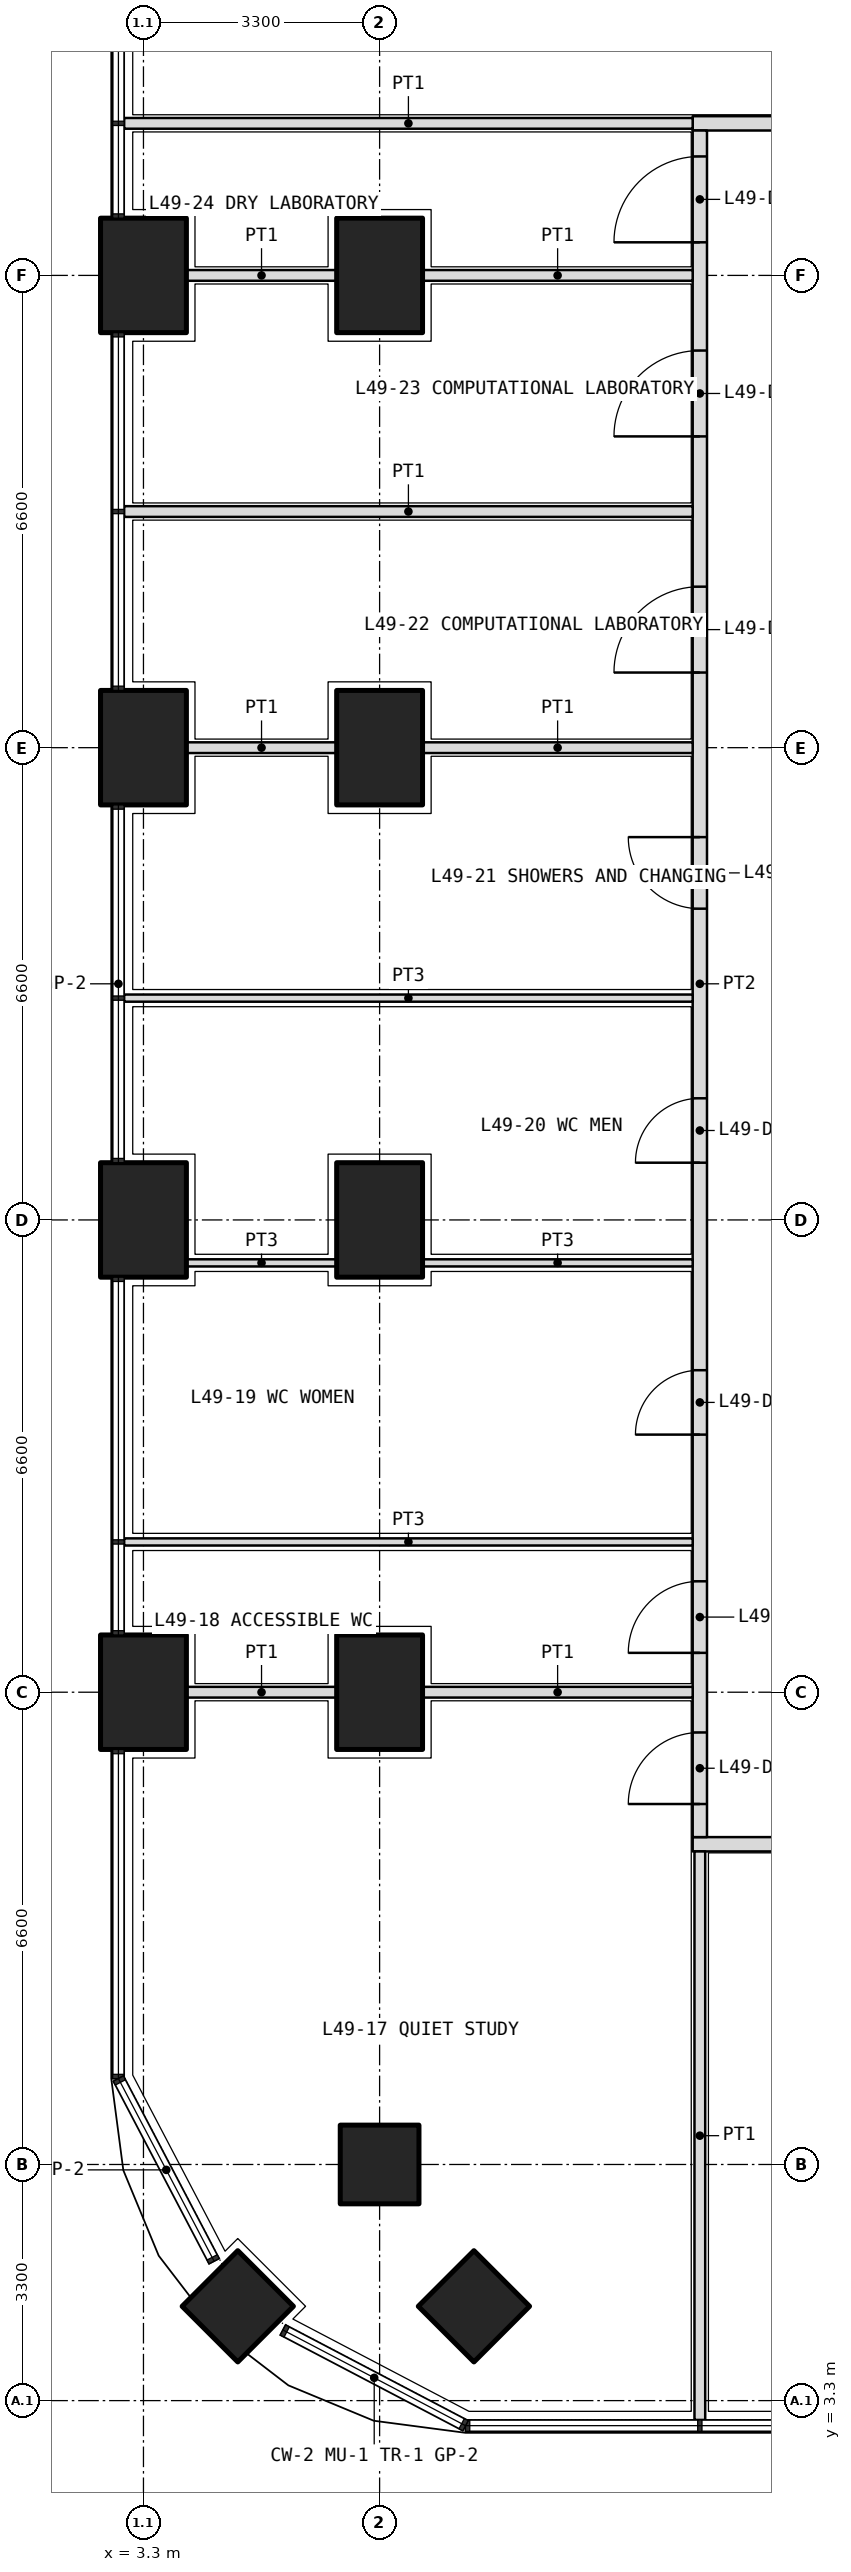
"""IFC4 building model, lengths in metres.
Left out: names, types, materials, properties, quantities, classifications, styles, units other than length and angle.
Written with IfcOpenShell. Run it as: python <this file> out.ifc"""

import sys

from ifc_helpers import new_model, si_unit, direction, frame, frame_2d, origin, origin_2d, place, context, subcontext, project, spatial, rectangle, extrude, element, fill, save


model = new_model("IFC4")
c1 = context("Model", 3, precision=1e-05, world=origin(), true_north=direction((0.0, 1.0)))
c2 = subcontext(c1, "Body", "Model", "MODEL_VIEW")
j1 = project(units=[si_unit("LENGTHUNIT", "METRE"), si_unit("PLANEANGLEUNIT", "RADIAN")], contexts=[c1])
p1 = place(None, origin())
s1 = spatial("IfcSite", under=j1, at=p1, CompositionType="ELEMENT")
p2 = place(p1, origin())
s2 = spatial("IfcBuilding", under=s1, at=p2, CompositionType="ELEMENT")
p3 = place(p2, frame((0.0, 0.0, 214.5)))
s3 = spatial("IfcBuildingStorey", under=s2, at=p3, CompositionType="ELEMENT", Elevation=214.5)
p4 = place(p3, frame((4.618, 4.618, 0.0), z_axis=(0.0, 0.0, 1.0), x_axis=(0.707106781187, 0.707106781187, 0.0)))
e1 = element("IfcColumn", 1, at=p4, inside=s3, PredefinedType="COLUMN", context=c2, shape_type="SweptSolid", body=[
    extrude(rectangle(XDim=1.1, YDim=1.1, at=origin_2d()), origin(), (0.0, 0.0, 1.0), 4.2),
])
for number, where, z_axis, x_axis in (
    (2, (3.3, 13.2, 0.0), (0.0, 0.0, 1.0), (0.0, 1.0, 0.0)),
    (3, (3.3, 19.8, 0.0), (0.0, 0.0, 1.0), (0.0, 1.0, 0.0)),
    (4, (3.3, 26.4, 0.0), (0.0, 0.0, 1.0), (0.0, 1.0, 0.0)),
    (5, (3.3, 33.0, 0.0), (0.0, 0.0, 1.0), (0.0, 1.0, 0.0)),
):
    element("IfcColumn", number, at=place(p3, frame(where, z_axis=z_axis, x_axis=x_axis)), inside=s3, PredefinedType="COLUMN", context=c2, shape_type="SweptSolid", body=[
        extrude(rectangle(XDim=1.6, YDim=1.2, at=origin_2d()), origin(), (0.0, 0.0, 1.0), 4.2),
    ])
for number, where, z_axis, x_axis in (
    (6, (6.6, 6.6, 0.0), (0.0, 0.0, 1.0), (1.0, 0.0, 0.0)),
    (7, (7.918, 4.618, 0.0), (0.0, 0.0, 1.0), (0.707, 0.707, 0.0)),
):
    element("IfcColumn", number, at=place(p3, frame(where, z_axis=z_axis, x_axis=x_axis)), inside=s3, PredefinedType="COLUMN", context=c2, shape_type="SweptSolid", body=[
        extrude(rectangle(XDim=1.1, YDim=1.1, at=origin_2d()), origin(), (0.0, 0.0, 1.0), 4.2),
    ])
for number, where, z_axis, x_axis in (
    (8, (6.6, 13.2, 0.0), (0.0, 0.0, 1.0), (0.0, 1.0, 0.0)),
    (9, (6.6, 19.8, 0.0), (0.0, 0.0, 1.0), (0.0, 1.0, 0.0)),
    (10, (6.6, 26.4, 0.0), (0.0, 0.0, 1.0), (0.0, 1.0, 0.0)),
    (11, (6.6, 33.0, 0.0), (0.0, 0.0, 1.0), (0.0, 1.0, 0.0)),
):
    element("IfcColumn", number, at=place(p3, frame(where, z_axis=z_axis, x_axis=x_axis)), inside=s3, PredefinedType="COLUMN", context=c2, shape_type="SweptSolid", body=[
        extrude(rectangle(XDim=1.6, YDim=1.2, at=origin_2d()), origin(), (0.0, 0.0, 1.0), 4.2),
    ])
p5 = place(p3, frame((10.975, 11.075, 0.0), z_axis=(0.0, 0.0, 1.0), x_axis=(1.0, 0.0, 0.0)))
e12 = element("IfcWall", 12, at=p5, inside=s3, PredefinedType="PARTITIONING", context=c2, shape_type="SweptSolid", body=[
    extrude(rectangle(XDim=30.85, YDim=0.2, at=frame_2d((15.425, 0.0))), origin(), (0.0, 0.0, 1.0), 2.85),
])
p6 = place(p5, frame((2.312, 0.0, 0.0)))
e13 = element("IfcOpeningElement", 13, at=p6, cuts=e12, PredefinedType="OPENING", context=c2, shape_type="SweptSolid", body=[
    extrude(rectangle(XDim=1.0, YDim=2.1, at=frame_2d((0.5, 1.05))), frame((0.0, 0.11, 0.0), z_axis=(0.0, -1.0, 0.0), x_axis=(1.0, 0.0, 0.0)), (0.0, 0.0, 1.0), 0.22),
])
p7 = place(p5, frame((9.975, 0.0, 0.0)))
e14 = element("IfcOpeningElement", 14, at=p7, cuts=e12, PredefinedType="OPENING", context=c2, shape_type="SweptSolid", body=[
    extrude(rectangle(XDim=1.0, YDim=2.1, at=frame_2d((0.5, 1.05))), frame((0.0, 0.11, 0.0), z_axis=(0.0, -1.0, 0.0), x_axis=(1.0, 0.0, 0.0)), (0.0, 0.0, 1.0), 0.22),
])
p8 = place(p5, frame((16.575, 0.0, 0.0)))
e15 = element("IfcOpeningElement", 15, at=p8, cuts=e12, PredefinedType="OPENING", context=c2, shape_type="SweptSolid", body=[
    extrude(rectangle(XDim=1.0, YDim=2.1, at=frame_2d((0.5, 1.05))), frame((0.0, 0.11, 0.0), z_axis=(0.0, -1.0, 0.0), x_axis=(1.0, 0.0, 0.0)), (0.0, 0.0, 1.0), 0.22),
])
p9 = place(p5, frame((23.175, 0.0, 0.0)))
e16 = element("IfcOpeningElement", 16, at=p9, cuts=e12, PredefinedType="OPENING", context=c2, shape_type="SweptSolid", body=[
    extrude(rectangle(XDim=1.0, YDim=2.1, at=frame_2d((0.5, 1.05))), frame((0.0, 0.11, 0.0), z_axis=(0.0, -1.0, 0.0), x_axis=(1.0, 0.0, 0.0)), (0.0, 0.0, 1.0), 0.22),
])
p10 = place(p5, frame((29.188, 0.0, 0.0)))
e17 = element("IfcOpeningElement", 17, at=p10, cuts=e12, PredefinedType="OPENING", context=c2, shape_type="SweptSolid", body=[
    extrude(rectangle(XDim=1.0, YDim=2.1, at=frame_2d((0.5, 1.05))), frame((0.0, 0.11, 0.0), z_axis=(0.0, -1.0, 0.0), x_axis=(1.0, 0.0, 0.0)), (0.0, 0.0, 1.0), 0.22),
])
p11 = place(p3, frame((10.975, 35.125, 0.0), z_axis=(0.0, 0.0, 1.0), x_axis=(1.0, 0.0, 0.0)))
e18 = element("IfcWall", 18, at=p11, inside=s3, PredefinedType="PARTITIONING", context=c2, shape_type="SweptSolid", body=[
    extrude(rectangle(XDim=5.525, YDim=0.2, at=frame_2d((2.762, 0.0))), origin(), (0.0, 0.0, 1.0), 2.85),
])
p12 = place(p11, frame((2.312, 0.0, 0.0)))
e19 = element("IfcOpeningElement", 19, at=p12, cuts=e18, PredefinedType="OPENING", context=c2, shape_type="SweptSolid", body=[
    extrude(rectangle(XDim=1.0, YDim=2.1, at=frame_2d((0.5, 1.05))), frame((0.0, 0.11, 0.0), z_axis=(0.0, -1.0, 0.0), x_axis=(1.0, 0.0, 0.0)), (0.0, 0.0, 1.0), 0.22),
])
p13 = place(p3, frame((11.075, 11.175, 0.0), z_axis=(0.0, 0.0, 1.0), x_axis=(0.0, 1.0, 0.0)))
e20 = element("IfcWall", 20, at=p13, inside=s3, PredefinedType="PARTITIONING", context=c2, shape_type="SweptSolid", body=[
    extrude(rectangle(XDim=23.85, YDim=0.2, at=frame_2d((11.925, 0.0))), origin(), (0.0, 0.0, 1.0), 2.85),
])
p14 = place(p13, frame((0.462, 0.0, 0.0)))
e21 = element("IfcOpeningElement", 21, at=p14, cuts=e20, PredefinedType="OPENING", context=c2, shape_type="SweptSolid", body=[
    extrude(rectangle(XDim=1.0, YDim=2.1, at=frame_2d((0.5, 1.05))), frame((0.0, 0.11, 0.0), z_axis=(0.0, -1.0, 0.0), x_axis=(1.0, 0.0, 0.0)), (0.0, 0.0, 1.0), 0.22),
])
p15 = place(p13, frame((2.575, 0.0, 0.0)))
e22 = element("IfcOpeningElement", 22, at=p15, cuts=e20, PredefinedType="OPENING", context=c2, shape_type="SweptSolid", body=[
    extrude(rectangle(XDim=1.0, YDim=2.1, at=frame_2d((0.5, 1.05))), frame((0.0, 0.11, 0.0), z_axis=(0.0, -1.0, 0.0), x_axis=(1.0, 0.0, 0.0)), (0.0, 0.0, 1.0), 0.22),
])
p16 = place(p13, frame((5.625, 0.0, 0.0)))
e23 = element("IfcOpeningElement", 23, at=p16, cuts=e20, PredefinedType="OPENING", context=c2, shape_type="SweptSolid", body=[
    extrude(rectangle(XDim=0.9, YDim=2.1, at=frame_2d((0.45, 1.05))), frame((0.0, 0.11, 0.0), z_axis=(0.0, -1.0, 0.0), x_axis=(1.0, 0.0, 0.0)), (0.0, 0.0, 1.0), 0.22),
])
p17 = place(p13, frame((9.425, 0.0, 0.0)))
e24 = element("IfcOpeningElement", 24, at=p17, cuts=e20, PredefinedType="OPENING", context=c2, shape_type="SweptSolid", body=[
    extrude(rectangle(XDim=0.9, YDim=2.1, at=frame_2d((0.45, 1.05))), frame((0.0, 0.11, 0.0), z_axis=(0.0, -1.0, 0.0), x_axis=(1.0, 0.0, 0.0)), (0.0, 0.0, 1.0), 0.22),
])
p18 = place(p13, frame((12.975, 0.0, 0.0)))
e25 = element("IfcOpeningElement", 25, at=p18, cuts=e20, PredefinedType="OPENING", context=c2, shape_type="SweptSolid", body=[
    extrude(rectangle(XDim=1.0, YDim=2.1, at=frame_2d((0.5, 1.05))), frame((0.0, 0.11, 0.0), z_axis=(0.0, -1.0, 0.0), x_axis=(1.0, 0.0, 0.0)), (0.0, 0.0, 1.0), 0.22),
])
p19 = place(p13, frame((16.275, 0.0, 0.0)))
e26 = element("IfcOpeningElement", 26, at=p19, cuts=e20, PredefinedType="OPENING", context=c2, shape_type="SweptSolid", body=[
    extrude(rectangle(XDim=1.2, YDim=2.1, at=frame_2d((0.6, 1.05))), frame((0.0, 0.11, 0.0), z_axis=(0.0, -1.0, 0.0), x_axis=(1.0, 0.0, 0.0)), (0.0, 0.0, 1.0), 0.22),
])
p20 = place(p13, frame((19.575, 0.0, 0.0)))
e27 = element("IfcOpeningElement", 27, at=p20, cuts=e20, PredefinedType="OPENING", context=c2, shape_type="SweptSolid", body=[
    extrude(rectangle(XDim=1.2, YDim=2.1, at=frame_2d((0.6, 1.05))), frame((0.0, 0.11, 0.0), z_axis=(0.0, -1.0, 0.0), x_axis=(1.0, 0.0, 0.0)), (0.0, 0.0, 1.0), 0.22),
])
p21 = place(p13, frame((22.288, 0.0, 0.0)))
e28 = element("IfcOpeningElement", 28, at=p21, cuts=e20, PredefinedType="OPENING", context=c2, shape_type="SweptSolid", body=[
    extrude(rectangle(XDim=1.2, YDim=2.1, at=frame_2d((0.6, 1.05))), frame((0.0, 0.11, 0.0), z_axis=(0.0, -1.0, 0.0), x_axis=(1.0, 0.0, 0.0)), (0.0, 0.0, 1.0), 0.22),
])
for number, where, z_axis, x_axis in (
    (29, (11.075, 3.03, 0.0), (0.0, 0.0, 1.0), (0.0, 1.0, 0.0)),
    (30, (3.03, 35.125, 0.0), (0.0, 0.0, 1.0), (1.0, 0.0, 0.0)),
):
    element("IfcWall", number, at=place(p3, frame(where, z_axis=z_axis, x_axis=x_axis)), inside=s3, PredefinedType="PARTITIONING", context=c2, shape_type="SweptSolid", body=[
        extrude(rectangle(XDim=7.945, YDim=0.15, at=frame_2d((3.973, 0.0))), origin(), (0.0, 0.0, 1.0), 2.6),
    ])
p22 = place(p3, frame((3.03, 15.3, 0.0), z_axis=(0.0, 0.0, 1.0), x_axis=(1.0, 0.0, 0.0)))
e31 = element("IfcWall", 31, at=p22, inside=s3, PredefinedType="PARTITIONING", context=c2, shape_type="SweptSolid", body=[
    extrude(rectangle(XDim=7.945, YDim=0.1, at=frame_2d((3.973, 0.0))), origin(), (0.0, 0.0, 1.0), 2.6),
])
p23 = place(p3, frame((3.9, 19.2, 0.0), z_axis=(0.0, 0.0, 1.0), x_axis=(1.0, 0.0, 0.0)))
e32 = element("IfcWall", 32, at=p23, inside=s3, PredefinedType="PARTITIONING", context=c2, shape_type="SweptSolid", body=[
    extrude(rectangle(XDim=2.1, YDim=0.1, at=frame_2d((1.05, 0.0))), origin(), (0.0, 0.0, 1.0), 2.85),
])
p24 = place(p3, frame((7.2, 19.2, 0.0), z_axis=(0.0, 0.0, 1.0), x_axis=(1.0, 0.0, 0.0)))
e33 = element("IfcWall", 33, at=p24, inside=s3, PredefinedType="PARTITIONING", context=c2, shape_type="SweptSolid", body=[
    extrude(rectangle(XDim=3.775, YDim=0.1, at=frame_2d((1.888, 0.0))), origin(), (0.0, 0.0, 1.0), 2.85),
])
p25 = place(p3, frame((3.03, 22.9, 0.0), z_axis=(0.0, 0.0, 1.0), x_axis=(1.0, 0.0, 0.0)))
e34 = element("IfcWall", 34, at=p25, inside=s3, PredefinedType="PARTITIONING", context=c2, shape_type="SweptSolid", body=[
    extrude(rectangle(XDim=7.945, YDim=0.1, at=frame_2d((3.973, 0.0))), origin(), (0.0, 0.0, 1.0), 2.6),
])
p26 = place(p3, frame((3.9, 13.2, 0.0), z_axis=(0.0, 0.0, 1.0), x_axis=(1.0, 0.0, 0.0)))
e35 = element("IfcWall", 35, at=p26, inside=s3, PredefinedType="PARTITIONING", context=c2, shape_type="SweptSolid", body=[
    extrude(rectangle(XDim=2.1, YDim=0.15, at=frame_2d((1.05, 0.0))), origin(), (0.0, 0.0, 1.0), 2.85),
])
p27 = place(p3, frame((7.2, 13.2, 0.0), z_axis=(0.0, 0.0, 1.0), x_axis=(1.0, 0.0, 0.0)))
e36 = element("IfcWall", 36, at=p27, inside=s3, PredefinedType="PARTITIONING", context=c2, shape_type="SweptSolid", body=[
    extrude(rectangle(XDim=3.775, YDim=0.15, at=frame_2d((1.888, 0.0))), origin(), (0.0, 0.0, 1.0), 2.85),
])
p28 = place(p3, frame((3.9, 26.4, 0.0), z_axis=(0.0, 0.0, 1.0), x_axis=(1.0, 0.0, 0.0)))
e37 = element("IfcWall", 37, at=p28, inside=s3, PredefinedType="PARTITIONING", context=c2, shape_type="SweptSolid", body=[
    extrude(rectangle(XDim=2.1, YDim=0.15, at=frame_2d((1.05, 0.0))), origin(), (0.0, 0.0, 1.0), 2.85),
])
p29 = place(p3, frame((7.2, 26.4, 0.0), z_axis=(0.0, 0.0, 1.0), x_axis=(1.0, 0.0, 0.0)))
e38 = element("IfcWall", 38, at=p29, inside=s3, PredefinedType="PARTITIONING", context=c2, shape_type="SweptSolid", body=[
    extrude(rectangle(XDim=3.775, YDim=0.15, at=frame_2d((1.888, 0.0))), origin(), (0.0, 0.0, 1.0), 2.85),
])
p30 = place(p3, frame((3.03, 29.7, 0.0), z_axis=(0.0, 0.0, 1.0), x_axis=(1.0, 0.0, 0.0)))
e39 = element("IfcWall", 39, at=p30, inside=s3, PredefinedType="PARTITIONING", context=c2, shape_type="SweptSolid", body=[
    extrude(rectangle(XDim=7.945, YDim=0.15, at=frame_2d((3.973, 0.0))), origin(), (0.0, 0.0, 1.0), 2.6),
])
p31 = place(p3, frame((3.9, 33.0, 0.0), z_axis=(0.0, 0.0, 1.0), x_axis=(1.0, 0.0, 0.0)))
e40 = element("IfcWall", 40, at=p31, inside=s3, PredefinedType="PARTITIONING", context=c2, shape_type="SweptSolid", body=[
    extrude(rectangle(XDim=2.1, YDim=0.15, at=frame_2d((1.05, 0.0))), origin(), (0.0, 0.0, 1.0), 2.85),
])
p32 = place(p3, frame((7.2, 33.0, 0.0), z_axis=(0.0, 0.0, 1.0), x_axis=(1.0, 0.0, 0.0)))
e41 = element("IfcWall", 41, at=p32, inside=s3, PredefinedType="PARTITIONING", context=c2, shape_type="SweptSolid", body=[
    extrude(rectangle(XDim=3.775, YDim=0.15, at=frame_2d((1.888, 0.0))), origin(), (0.0, 0.0, 1.0), 2.85),
])
p33 = place(p14, origin())
e42 = element("IfcDoor", 42, at=p33, inside=s3, OperationType="SINGLE_SWING_LEFT", PredefinedType="DOOR", context=c2, shape_type="SweptSolid", body=[
    extrude(rectangle(XDim=1.0, YDim=2.1, at=frame_2d((0.5, 1.05))), frame((0.0, 0.025, 0.0), z_axis=(0.0, -1.0, 0.0), x_axis=(1.0, 0.0, 0.0)), (0.0, 0.0, 1.0), 0.05),
])
fill(e21, e42)
p34 = place(p15, origin())
e43 = element("IfcDoor", 43, at=p34, inside=s3, OperationType="SINGLE_SWING_LEFT", PredefinedType="DOOR", context=c2, shape_type="SweptSolid", body=[
    extrude(rectangle(XDim=1.0, YDim=2.1, at=frame_2d((0.5, 1.05))), frame((0.0, 0.025, 0.0), z_axis=(0.0, -1.0, 0.0), x_axis=(1.0, 0.0, 0.0)), (0.0, 0.0, 1.0), 0.05),
])
fill(e22, e43)
p35 = place(p16, origin())
e44 = element("IfcDoor", 44, at=p35, inside=s3, OperationType="SINGLE_SWING_LEFT", PredefinedType="DOOR", context=c2, shape_type="SweptSolid", body=[
    extrude(rectangle(XDim=0.9, YDim=2.1, at=frame_2d((0.45, 1.05))), frame((0.0, 0.025, 0.0), z_axis=(0.0, -1.0, 0.0), x_axis=(1.0, 0.0, 0.0)), (0.0, 0.0, 1.0), 0.05),
])
fill(e23, e44)
p36 = place(p17, origin())
e45 = element("IfcDoor", 45, at=p36, inside=s3, OperationType="SINGLE_SWING_LEFT", PredefinedType="DOOR", context=c2, shape_type="SweptSolid", body=[
    extrude(rectangle(XDim=0.9, YDim=2.1, at=frame_2d((0.45, 1.05))), frame((0.0, 0.025, 0.0), z_axis=(0.0, -1.0, 0.0), x_axis=(1.0, 0.0, 0.0)), (0.0, 0.0, 1.0), 0.05),
])
fill(e24, e45)
p37 = place(p18, origin())
e46 = element("IfcDoor", 46, at=p37, inside=s3, OperationType="SINGLE_SWING_RIGHT", PredefinedType="DOOR", context=c2, shape_type="SweptSolid", body=[
    extrude(rectangle(XDim=1.0, YDim=2.1, at=frame_2d((0.5, 1.05))), frame((0.0, 0.025, 0.0), z_axis=(0.0, -1.0, 0.0), x_axis=(1.0, 0.0, 0.0)), (0.0, 0.0, 1.0), 0.05),
])
fill(e25, e46)
p38 = place(p19, origin())
e47 = element("IfcDoor", 47, at=p38, inside=s3, OperationType="DOUBLE_DOOR_SINGLE_SWING", PredefinedType="DOOR", context=c2, shape_type="SweptSolid", body=[
    extrude(rectangle(XDim=1.2, YDim=2.1, at=frame_2d((0.6, 1.05))), frame((0.0, 0.025, 0.0), z_axis=(0.0, -1.0, 0.0), x_axis=(1.0, 0.0, 0.0)), (0.0, 0.0, 1.0), 0.05),
])
fill(e26, e47)
p39 = place(p20, origin())
e48 = element("IfcDoor", 48, at=p39, inside=s3, OperationType="DOUBLE_DOOR_SINGLE_SWING", PredefinedType="DOOR", context=c2, shape_type="SweptSolid", body=[
    extrude(rectangle(XDim=1.2, YDim=2.1, at=frame_2d((0.6, 1.05))), frame((0.0, 0.025, 0.0), z_axis=(0.0, -1.0, 0.0), x_axis=(1.0, 0.0, 0.0)), (0.0, 0.0, 1.0), 0.05),
])
fill(e27, e48)
p40 = place(p21, origin())
e49 = element("IfcDoor", 49, at=p40, inside=s3, OperationType="DOUBLE_DOOR_SINGLE_SWING", PredefinedType="DOOR", context=c2, shape_type="SweptSolid", body=[
    extrude(rectangle(XDim=1.2, YDim=2.1, at=frame_2d((0.6, 1.05))), frame((0.0, 0.025, 0.0), z_axis=(0.0, -1.0, 0.0), x_axis=(1.0, 0.0, 0.0)), (0.0, 0.0, 1.0), 0.05),
])
fill(e28, e49)
save(model, sys.argv[1])
